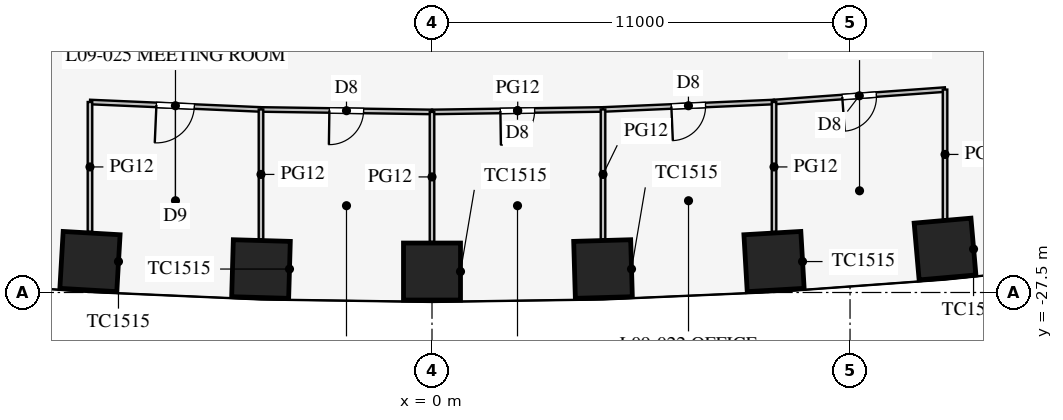
"""IFC4 building model, lengths in metres.
Left out: names, types, materials, properties, quantities, classifications, styles, units other than length and angle.
Written with IfcOpenShell. Run it as: python <this file> out.ifc"""

import sys

from ifc_helpers import new_model, si_unit, direction, frame, frame_2d, origin, origin_2d, place, context, subcontext, project, spatial, rectangle, extrude, element, fill, save


model = new_model("IFC4")
c1 = context("Model", 3, precision=1e-05, world=origin(), true_north=direction((0.0, 1.0)))
c2 = subcontext(c1, "Body", "Model", "MODEL_VIEW")
j1 = project(units=[si_unit("LENGTHUNIT", "METRE"), si_unit("PLANEANGLEUNIT", "RADIAN")], contexts=[c1])
p1 = place(None, origin())
s1 = spatial("IfcSite", under=j1, at=p1, CompositionType="ELEMENT")
p2 = place(p1, origin())
s2 = spatial("IfcBuilding", under=s1, at=p2, CompositionType="ELEMENT")
p3 = place(p2, frame((0.0, 0.0, 41.7)))
s3 = spatial("IfcBuildingStorey", under=s2, at=p3, CompositionType="ELEMENT", Elevation=41.7)
for number, where, z_axis, x_axis in (
    (1, (-9.0, -26.686, 0.0), (0.0, 0.0, 1.0), (0.998, -0.058, 0.0)),
    (2, (-4.5, -26.883, 0.0), (0.0, 0.0, 1.0), (1.0, -0.029, 0.0)),
    (3, (0.0, -26.949, 0.0), (0.0, 0.0, 1.0), (1.0, 0.0, 0.0)),
    (4, (4.5, -26.883, 0.0), (0.0, 0.0, 1.0), (1.0, 0.029, 0.0)),
    (5, (9.0, -26.686, 0.0), (0.0, 0.0, 1.0), (0.998, 0.058, 0.0)),
    (6, (13.5, -26.357, 0.0), (0.0, 0.0, 1.0), (0.996, 0.087, 0.0)),
):
    element("IfcColumn", number, at=place(p3, frame(where, z_axis=z_axis, x_axis=x_axis)), inside=s3, PredefinedType="COLUMN", context=c2, shape_type="SweptSolid", body=[
        extrude(rectangle(XDim=1.5, YDim=1.5, at=origin_2d()), origin(), (0.0, 0.0, 1.0), 4.2),
    ])
p4 = place(p3, frame((0.0, -22.749, 0.0), z_axis=(0.0, 0.0, 1.0), x_axis=(0.999894311967, 0.014538393859, 0.0)))
e7 = element("IfcWall", 7, at=p4, inside=s3, PredefinedType="PARTITIONING", context=c2, shape_type="SweptSolid", body=[
    extrude(rectangle(XDim=4.5, YDim=0.12, at=frame_2d((2.25, 0.0))), origin(), (0.0, 0.0, 1.0), 2.9),
])
p5 = place(p4, frame((1.8, 0.0, 0.15)))
e8 = element("IfcOpeningElement", 8, at=p5, cuts=e7, PredefinedType="OPENING", context=c2, shape_type="SweptSolid", body=[
    extrude(rectangle(XDim=0.9, YDim=2.1, at=frame_2d((0.45, 1.05))), frame((0.0, 0.07, 0.0), z_axis=(0.0, -1.0, 0.0), x_axis=(1.0, 0.0, 0.0)), (0.0, 0.0, 1.0), 0.14),
])
p6 = place(p3, frame((4.5, -22.683, 0.0), z_axis=(0.0, 0.0, 1.0), x_axis=(0.999052370647, 0.043524254212, 0.0)))
e9 = element("IfcWall", 9, at=p6, inside=s3, PredefinedType="PARTITIONING", context=c2, shape_type="SweptSolid", body=[
    extrude(rectangle(XDim=4.504, YDim=0.12, at=frame_2d((2.252, 0.0))), origin(), (0.0, 0.0, 1.0), 2.9),
])
p7 = place(p6, frame((1.8, 0.0, 0.15)))
e10 = element("IfcOpeningElement", 10, at=p7, cuts=e9, PredefinedType="OPENING", context=c2, shape_type="SweptSolid", body=[
    extrude(rectangle(XDim=0.9, YDim=2.1, at=frame_2d((0.45, 1.05))), frame((0.0, 0.07, 0.0), z_axis=(0.0, -1.0, 0.0), x_axis=(1.0, 0.0, 0.0)), (0.0, 0.0, 1.0), 0.14),
])
p8 = place(p3, frame((9.0, -22.487, 0.0), z_axis=(0.0, 0.0, 1.0), x_axis=(0.997363894896, 0.072562119306, 0.0)))
e11 = element("IfcWall", 11, at=p8, inside=s3, PredefinedType="PARTITIONING", context=c2, shape_type="SweptSolid", body=[
    extrude(rectangle(XDim=4.512, YDim=0.12, at=frame_2d((2.256, 0.0))), origin(), (0.0, 0.0, 1.0), 2.9),
])
p9 = place(p8, frame((1.8, 0.0, 0.15)))
e12 = element("IfcOpeningElement", 12, at=p9, cuts=e11, PredefinedType="OPENING", context=c2, shape_type="SweptSolid", body=[
    extrude(rectangle(XDim=0.9, YDim=2.1, at=frame_2d((0.45, 1.05))), frame((0.0, 0.07, 0.0), z_axis=(0.0, -1.0, 0.0), x_axis=(1.0, 0.0, 0.0)), (0.0, 0.0, 1.0), 0.14),
])
p10 = place(p3, frame((-4.5, -22.683, 0.0), z_axis=(0.0, 0.0, 1.0), x_axis=(0.999894311967, -0.014538393859, 0.0)))
e13 = element("IfcWall", 13, at=p10, inside=s3, PredefinedType="PARTITIONING", context=c2, shape_type="SweptSolid", body=[
    extrude(rectangle(XDim=4.5, YDim=0.12, at=frame_2d((2.25, 0.0))), origin(), (0.0, 0.0, 1.0), 2.9),
])
p11 = place(p10, frame((1.8, 0.0, 0.15)))
e14 = element("IfcOpeningElement", 14, at=p11, cuts=e13, PredefinedType="OPENING", context=c2, shape_type="SweptSolid", body=[
    extrude(rectangle(XDim=0.9, YDim=2.1, at=frame_2d((0.45, 1.05))), frame((0.0, 0.07, 0.0), z_axis=(0.0, -1.0, 0.0), x_axis=(1.0, 0.0, 0.0)), (0.0, 0.0, 1.0), 0.14),
])
p12 = place(p3, frame((-9.0, -22.487, 0.0), z_axis=(0.0, 0.0, 1.0), x_axis=(0.999052370647, -0.043524254212, 0.0)))
e15 = element("IfcWall", 15, at=p12, inside=s3, PredefinedType="PARTITIONING", context=c2, shape_type="SweptSolid", body=[
    extrude(rectangle(XDim=4.504, YDim=0.12, at=frame_2d((2.252, 0.0))), origin(), (0.0, 0.0, 1.0), 2.9),
])
p13 = place(p12, frame((1.75, 0.0, 0.15)))
e16 = element("IfcOpeningElement", 16, at=p13, cuts=e15, PredefinedType="OPENING", context=c2, shape_type="SweptSolid", body=[
    extrude(rectangle(XDim=1.0, YDim=2.1, at=frame_2d((0.5, 1.05))), frame((0.0, 0.07, 0.0), z_axis=(0.0, -1.0, 0.0), x_axis=(1.0, 0.0, 0.0)), (0.0, 0.0, 1.0), 0.14),
])
p14 = place(p3, frame((0.0, -22.749, 0.0), z_axis=(0.0, 0.0, 1.0), x_axis=(0.0, -1.0, 0.0)))
e17 = element("IfcWall", 17, at=p14, inside=s3, PredefinedType="PARTITIONING", context=c2, shape_type="SweptSolid", body=[
    extrude(rectangle(XDim=3.42, YDim=0.12, at=frame_2d((1.71, 0.0))), origin(), (0.0, 0.0, 1.0), 2.9),
])
p15 = place(p3, frame((13.5, -22.16, 0.0), z_axis=(0.0, 0.0, 1.0), x_axis=(0.0, -1.0, 0.0)))
e18 = element("IfcWall", 18, at=p15, inside=s3, PredefinedType="PARTITIONING", context=c2, shape_type="SweptSolid", body=[
    extrude(rectangle(XDim=3.414, YDim=0.12, at=frame_2d((1.707, 0.0))), origin(), (0.0, 0.0, 1.0), 2.9),
])
p16 = place(p3, frame((4.5, -22.683, 0.0), z_axis=(0.0, 0.0, 1.0), x_axis=(0.0, -1.0, 0.0)))
e19 = element("IfcWall", 19, at=p16, inside=s3, PredefinedType="PARTITIONING", context=c2, shape_type="SweptSolid", body=[
    extrude(rectangle(XDim=3.419, YDim=0.12, at=frame_2d((1.71, 0.0))), origin(), (0.0, 0.0, 1.0), 2.9),
])
p17 = place(p3, frame((9.0, -22.487, 0.0), z_axis=(0.0, 0.0, 1.0), x_axis=(0.0, -1.0, 0.0)))
e20 = element("IfcWall", 20, at=p17, inside=s3, PredefinedType="PARTITIONING", context=c2, shape_type="SweptSolid", body=[
    extrude(rectangle(XDim=3.417, YDim=0.12, at=frame_2d((1.709, 0.0))), origin(), (0.0, 0.0, 1.0), 2.9),
])
p18 = place(p3, frame((-4.5, -22.683, 0.0), z_axis=(0.0, 0.0, 1.0), x_axis=(0.0, -1.0, 0.0)))
e21 = element("IfcWall", 21, at=p18, inside=s3, PredefinedType="PARTITIONING", context=c2, shape_type="SweptSolid", body=[
    extrude(rectangle(XDim=3.419, YDim=0.12, at=frame_2d((1.71, 0.0))), origin(), (0.0, 0.0, 1.0), 2.9),
])
p19 = place(p3, frame((-9.0, -22.487, 0.0), z_axis=(0.0, 0.0, 1.0), x_axis=(0.0, -1.0, 0.0)))
e22 = element("IfcWall", 22, at=p19, inside=s3, PredefinedType="PARTITIONING", context=c2, shape_type="SweptSolid", body=[
    extrude(rectangle(XDim=3.417, YDim=0.12, at=frame_2d((1.709, 0.0))), origin(), (0.0, 0.0, 1.0), 2.9),
])
p20 = place(p9, frame((0.9, 0.0, 0.0), z_axis=(0.0, 0.0, 1.0), x_axis=(-1.0, 0.0, 0.0)))
e23 = element("IfcDoor", 23, at=p20, inside=s3, OperationType="SINGLE_SWING_RIGHT", PredefinedType="DOOR", context=c2, shape_type="SweptSolid", body=[
    extrude(rectangle(XDim=0.9, YDim=2.1, at=frame_2d((0.45, 1.05))), frame((0.0, 0.025, 0.0), z_axis=(0.0, -1.0, 0.0), x_axis=(1.0, 0.0, 0.0)), (0.0, 0.0, 1.0), 0.05),
])
fill(e12, e23)
p21 = place(p7, frame((0.9, 0.0, 0.0), z_axis=(0.0, 0.0, 1.0), x_axis=(-1.0, 0.0, 0.0)))
e24 = element("IfcDoor", 24, at=p21, inside=s3, OperationType="SINGLE_SWING_RIGHT", PredefinedType="DOOR", context=c2, shape_type="SweptSolid", body=[
    extrude(rectangle(XDim=0.9, YDim=2.1, at=frame_2d((0.45, 1.05))), frame((0.0, 0.025, 0.0), z_axis=(0.0, -1.0, 0.0), x_axis=(1.0, 0.0, 0.0)), (0.0, 0.0, 1.0), 0.05),
])
fill(e10, e24)
p22 = place(p5, frame((0.9, 0.0, 0.0), z_axis=(0.0, 0.0, 1.0), x_axis=(-1.0, 0.0, 0.0)))
e25 = element("IfcDoor", 25, at=p22, inside=s3, OperationType="SINGLE_SWING_RIGHT", PredefinedType="DOOR", context=c2, shape_type="SweptSolid", body=[
    extrude(rectangle(XDim=0.9, YDim=2.1, at=frame_2d((0.45, 1.05))), frame((0.0, 0.025, 0.0), z_axis=(0.0, -1.0, 0.0), x_axis=(1.0, 0.0, 0.0)), (0.0, 0.0, 1.0), 0.05),
])
fill(e8, e25)
p23 = place(p11, frame((0.9, 0.0, 0.0), z_axis=(0.0, 0.0, 1.0), x_axis=(-1.0, 0.0, 0.0)))
e26 = element("IfcDoor", 26, at=p23, inside=s3, OperationType="SINGLE_SWING_RIGHT", PredefinedType="DOOR", context=c2, shape_type="SweptSolid", body=[
    extrude(rectangle(XDim=0.9, YDim=2.1, at=frame_2d((0.45, 1.05))), frame((0.0, 0.025, 0.0), z_axis=(0.0, -1.0, 0.0), x_axis=(1.0, 0.0, 0.0)), (0.0, 0.0, 1.0), 0.05),
])
fill(e14, e26)
p24 = place(p13, frame((1.0, 0.0, 0.0), z_axis=(0.0, 0.0, 1.0), x_axis=(-1.0, 0.0, 0.0)))
e27 = element("IfcDoor", 27, at=p24, inside=s3, OperationType="SINGLE_SWING_RIGHT", PredefinedType="DOOR", context=c2, shape_type="SweptSolid", body=[
    extrude(rectangle(XDim=1.0, YDim=2.1, at=frame_2d((0.5, 1.05))), frame((0.0, 0.025, 0.0), z_axis=(0.0, -1.0, 0.0), x_axis=(1.0, 0.0, 0.0)), (0.0, 0.0, 1.0), 0.05),
])
fill(e16, e27)
save(model, sys.argv[1])
